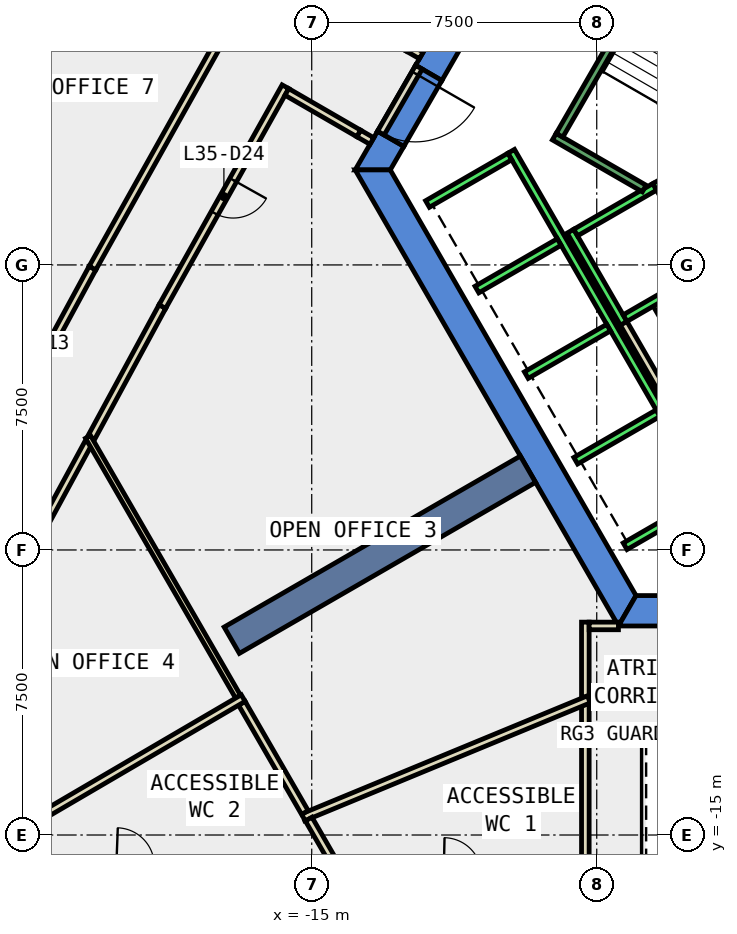
"""IFC4 building model, lengths in metres.
Left out: names, types, materials, properties, quantities, classifications, styles, units other than length and angle.
Written with IfcOpenShell. Run it as: python <this file> out.ifc"""

import sys

from ifc_helpers import new_model, si_unit, direction, frame, frame_2d, origin, place, context, subcontext, project, spatial, polyline, rectangle, outline, extrude, element, fill, save


model = new_model("IFC4")
c1 = context("Model", 3, precision=1e-05, world=origin(), true_north=direction((0.0, 1.0)))
c2 = subcontext(c1, "Body", "Model", "MODEL_VIEW")
j1 = project(units=[si_unit("LENGTHUNIT", "METRE"), si_unit("PLANEANGLEUNIT", "RADIAN")], contexts=[c1])
p1 = place(None, origin())
s1 = spatial("IfcSite", under=j1, at=p1, CompositionType="ELEMENT")
p2 = place(p1, origin())
s2 = spatial("IfcBuilding", under=s1, at=p2, CompositionType="ELEMENT")
p3 = place(p2, frame((0.0, 0.0, 159.2)))
s3 = spatial("IfcBuildingStorey", under=s2, at=p3, CompositionType="ELEMENT", Elevation=159.2)
p4 = place(p3, frame((0.0, 0.0, -0.4)))
e1 = element("IfcWall", 1, at=p4, inside=s3, PredefinedType="SHEAR", context=c2, shape_type="SweptSolid", body=[
    extrude(outline(polyline([(-12.267, 5.252), (-11.575, 4.852), (-6.466, 13.7), (-6.928, 14.5), (-12.267, 5.252)])), origin(), (0.0, 0.0, 1.0), 4.2),
])
p5 = place(p3, frame((0.0, 0.0, -0.4)))
e2 = element("IfcWall", 2, at=p5, inside=s3, PredefinedType="SHEAR", context=c2, shape_type="SweptSolid", body=[
    extrude(outline(polyline([(-12.575, 3.12), (-13.267, 3.52), (-13.856, 2.5), (-12.933, 2.5), (-12.575, 3.12)])), origin(), (0.0, 0.0, 1.0), 4.2),
])
p6 = place(p3, frame((0.0, 0.0, 3.6)))
e3 = element("IfcWall", 3, at=p6, inside=s3, PredefinedType="SHEAR", context=c2, shape_type="SweptSolid", body=[
    extrude(outline(polyline([(-13.267, 3.52), (-12.575, 3.12), (-11.575, 4.852), (-12.267, 5.252), (-13.267, 3.52)])), origin(), (0.0, 0.0, 1.0), 0.2),
])
p7 = place(p3, frame((0.0, 0.0, -0.4)))
e4 = element("IfcWall", 4, at=p7, inside=s3, PredefinedType="SHEAR", context=c2, shape_type="SweptSolid", body=[
    extrude(outline(polyline([(-13.856, 2.5), (-6.928, -9.5), (-6.466, -8.7), (-12.933, 2.5), (-13.856, 2.5)])), origin(), (0.0, 0.0, 1.0), 4.2),
])
p8 = place(p3, frame((0.0, 0.0, -0.4)))
e5 = element("IfcWall", 5, at=p8, inside=s3, PredefinedType="SHEAR", context=c2, shape_type="SweptSolid", body=[
    extrude(outline(polyline([(3.75, -9.5), (3.75, -8.7), (-6.466, -8.7), (-6.928, -9.5), (3.75, -9.5)])), origin(), (0.0, 0.0, 1.0), 4.2),
])
p9 = place(p3, frame((-9.31, -5.375, -0.4), z_axis=(0.0, 0.0, 1.0), x_axis=(-0.866017533419, -0.500013631625, 0.0)))
e6 = element("IfcWall", 6, at=p9, inside=s3, PredefinedType="SHEAR", context=c2, shape_type="SweptSolid", body=[
    extrude(rectangle(XDim=9.0, YDim=0.8, at=frame_2d((4.5, 0.0))), origin(), (0.0, 0.0, 1.0), 4.2),
])
p10 = place(p3, frame((-18.93, -1.095, 0.0), z_axis=(0.0, 0.0, 1.0), x_axis=(-0.476854303058, -0.878982351162, 0.0)))
e7 = element("IfcWall", 7, at=p10, inside=s3, PredefinedType="PARTITIONING", context=c2, shape_type="SweptSolid", body=[
    extrude(rectangle(XDim=3.924, YDim=0.2, at=frame_2d((1.962, 0.0))), origin(), (0.0, 0.0, 1.0), 3.8),
])
p11 = place(p3, frame((-13.417, 3.26, 0.0), z_axis=(0.0, 0.0, 1.0), x_axis=(-0.866398669086, 0.499352927503, 0.0)))
e8 = element("IfcWall", 8, at=p11, inside=s3, PredefinedType="PARTITIONING", context=c2, shape_type="SweptSolid", body=[
    extrude(rectangle(XDim=0.4, YDim=0.2, at=frame_2d((0.2, 0.0))), origin(), (0.0, 0.0, 1.0), 2.4),
])
p12 = place(p3, frame((-15.692, 4.689, 0.0), z_axis=(0.0, 0.0, 1.0), x_axis=(-0.48849233301, -0.872568186786, 0.0)))
e9 = element("IfcWall", 9, at=p12, inside=s3, PredefinedType="PARTITIONING", context=c2, shape_type="SweptSolid", body=[
    extrude(rectangle(XDim=6.629, YDim=0.2, at=frame_2d((3.314, 0.0))), origin(), (0.0, 0.0, 1.0), 3.8),
])
p13 = place(p12, frame((2.814, 0.0, 0.0)))
e10 = element("IfcOpeningElement", 10, at=p13, cuts=e9, PredefinedType="OPENING", context=c2, shape_type="SweptSolid", body=[
    extrude(rectangle(XDim=1.0, YDim=2.1, at=frame_2d((0.5, 1.05))), frame((0.0, 0.11, 0.0), z_axis=(0.0, -1.0, 0.0), x_axis=(1.0, 0.0, 0.0)), (0.0, 0.0, 1.0), 0.22),
])
p14 = place(p3, frame((-20.873, -4.676, 0.0), z_axis=(0.0, 0.0, 1.0), x_axis=(-0.476781985736, -0.879021579984, 0.0)))
e11 = element("IfcWall", 11, at=p14, inside=s3, PredefinedType="PARTITIONING", context=c2, shape_type="SweptSolid", body=[
    extrude(rectangle(XDim=2.869, YDim=0.2, at=frame_2d((1.435, 0.0))), origin(), (0.0, 0.0, 1.0), 3.8),
])
p15 = place(p3, frame((-24.13, -6.275, 0.0), z_axis=(0.0, 0.0, 1.0), x_axis=(0.476981750532, 0.878913198023, 0.0)))
e12 = element("IfcWall", 12, at=p15, inside=s3, PredefinedType="PARTITIONING", context=c2, shape_type="SweptSolid", body=[
    extrude(rectangle(XDim=7.046, YDim=0.2, at=frame_2d((3.523, 0.0))), origin(), (0.0, 0.0, 1.0), 3.8),
])
p16 = place(p15, frame((3.023, 0.0, 0.0)))
e13 = element("IfcOpeningElement", 13, at=p16, cuts=e12, PredefinedType="OPENING", context=c2, shape_type="SweptSolid", body=[
    extrude(rectangle(XDim=1.0, YDim=2.1, at=frame_2d((0.5, 1.05))), frame((0.0, 0.11, 0.0), z_axis=(0.0, -1.0, 0.0), x_axis=(1.0, 0.0, 0.0)), (0.0, 0.0, 1.0), 0.22),
])
p17 = place(p3, frame((-20.769, -0.082, 0.0), z_axis=(0.0, 0.0, 1.0), x_axis=(0.488387759141, 0.872626722443, 0.0)))
e14 = element("IfcWall", 14, at=p17, inside=s3, PredefinedType="PARTITIONING", context=c2, shape_type="SweptSolid", body=[
    extrude(rectangle(XDim=6.896, YDim=0.2, at=frame_2d((3.448, 0.0))), origin(), (0.0, 0.0, 1.0), 3.8),
])
p18 = place(p3, frame((-5.126, -2.422, 0.0), z_axis=(0.0, 0.0, 1.0), x_axis=(-0.500062241894, 0.865989465428, 0.0)))
e15 = element("IfcWall", 15, at=p18, inside=s3, PredefinedType="PARTITIONING", context=c2, shape_type="SweptSolid", body=[
    extrude(rectangle(XDim=1.7, YDim=0.2, at=frame_2d((0.85, 0.0))), origin(), (0.0, 0.0, 1.0), 3.8),
])
p19 = place(p3, frame((-5.492, -3.788, 0.0), z_axis=(0.0, 0.0, 1.0), x_axis=(-0.500008949224, 0.866020236886, 0.0)))
e16 = element("IfcWall", 16, at=p19, inside=s3, PredefinedType="PARTITIONING", context=c2, shape_type="SweptSolid", body=[
    extrude(rectangle(XDim=2.68, YDim=0.2, at=frame_2d((1.34, 0.0))), origin(), (0.0, 0.0, 1.0), 3.8),
])
p20 = place(p3, frame((-7.8, -11.368, 0.0), z_axis=(0.0, 0.0, 1.0), x_axis=(0.0, 1.0, 0.0)))
e17 = element("IfcWall", 17, at=p20, inside=s3, PredefinedType="PARTITIONING", context=c2, shape_type="SweptSolid", body=[
    extrude(rectangle(XDim=1.969, YDim=0.2, at=frame_2d((0.984, 0.0))), origin(), (0.0, 0.0, 1.0), 3.8),
])
p21 = place(p3, frame((-7.7, -9.499, 0.0), z_axis=(0.0, 0.0, 1.0), x_axis=(1.0, 0.0, 0.0)))
e18 = element("IfcWall", 18, at=p21, inside=s3, PredefinedType="PARTITIONING", context=c2, shape_type="SweptSolid", body=[
    extrude(rectangle(XDim=0.771, YDim=0.2, at=frame_2d((0.385, 0.0))), origin(), (0.0, 0.0, 1.0), 3.8),
])
p22 = place(p3, frame((-7.8, -16.055, 0.0), z_axis=(0.0, 0.0, 1.0), x_axis=(0.0, 1.0, 0.0)))
e19 = element("IfcWall", 19, at=p22, inside=s3, PredefinedType="PARTITIONING", context=c2, shape_type="SweptSolid", body=[
    extrude(rectangle(XDim=4.487, YDim=0.2, at=frame_2d((2.243, 0.0))), origin(), (0.0, 0.0, 1.0), 3.8),
])
p23 = place(p3, frame((-7.708, -11.43, 0.0), z_axis=(0.0, 0.0, 1.0), x_axis=(-0.924285151797, -0.381702709144, 0.0)))
e20 = element("IfcWall", 20, at=p23, inside=s3, PredefinedType="PARTITIONING", context=c2, shape_type="SweptSolid", body=[
    extrude(rectangle(XDim=8.129, YDim=0.2, at=frame_2d((4.065, 0.0))), origin(), (0.0, 0.0, 1.0), 3.8),
])
p24 = place(p3, frame((-16.939, -11.36, 0.0), z_axis=(0.0, 0.0, 1.0), x_axis=(-0.500053473428, 0.865994528685, 0.0)))
e21 = element("IfcWall", 21, at=p24, inside=s3, PredefinedType="PARTITIONING", context=c2, shape_type="SweptSolid", body=[
    extrude(rectangle(XDim=7.895, YDim=0.15, at=frame_2d((3.948, 0.0))), origin(), (0.0, 0.0, 1.0), 3.8),
])
p25 = place(p3, frame((-15.18, -14.408, 0.0), z_axis=(0.0, 0.0, 1.0), x_axis=(-0.499968694491, 0.866043477274, 0.0)))
e22 = element("IfcWall", 22, at=p25, inside=s3, PredefinedType="PARTITIONING", context=c2, shape_type="SweptSolid", body=[
    extrude(rectangle(XDim=3.319, YDim=0.2, at=frame_2d((1.659, 0.0))), origin(), (0.0, 0.0, 1.0), 3.8),
])
p26 = place(p3, frame((-14.256, -16.009, 0.0), z_axis=(0.0, 0.0, 1.0), x_axis=(-0.499786551025, 0.86614860354, 0.0)))
e23 = element("IfcWall", 23, at=p26, inside=s3, PredefinedType="PARTITIONING", context=c2, shape_type="SweptSolid", body=[
    extrude(rectangle(XDim=1.649, YDim=0.2, at=frame_2d((0.824, 0.0))), origin(), (0.0, 0.0, 1.0), 3.8),
])
p27 = place(p3, frame((-16.803, -11.397, 0.0), z_axis=(0.0, 0.0, 1.0), x_axis=(-0.863203941699, -0.504855380318, 0.0)))
e24 = element("IfcWall", 24, at=p27, inside=s3, PredefinedType="PARTITIONING", context=c2, shape_type="SweptSolid", body=[
    extrude(rectangle(XDim=8.232, YDim=0.2, at=frame_2d((4.116, 0.0))), origin(), (0.0, 0.0, 1.0), 3.8),
])
p28 = place(p3, frame((-12.18, 5.202, 0.0), z_axis=(0.0, 0.0, 1.0), x_axis=(-0.50002537861, -0.866010750942, 0.0)))
e25 = element("IfcWall", 25, at=p28, inside=s3, PredefinedType="PARTITIONING", context=c2, shape_type="SweptSolid", body=[
    extrude(rectangle(XDim=2.0, YDim=0.2, at=frame_2d((1.0, 0.0))), origin(), (0.0, 0.0, 1.0), 2.4),
])
p29 = place(p28, frame((0.19, 0.0, 0.0)))
e26 = element("IfcOpeningElement", 26, at=p29, cuts=e25, PredefinedType="OPENING", context=c2, shape_type="SweptSolid", body=[
    extrude(rectangle(XDim=1.8, YDim=2.1, at=frame_2d((0.9, 1.05))), frame((0.0, 0.11, 0.0), z_axis=(0.0, -1.0, 0.0), x_axis=(1.0, 0.0, 0.0)), (0.0, 0.0, 1.0), 0.22),
])
p30 = place(p3, frame((-12.463, 5.712, 0.0), z_axis=(0.0, 0.0, 1.0), x_axis=(0.865788603161, -0.500409926597, 0.0)))
e27 = element("IfcWall", 27, at=p30, inside=s3, PredefinedType="PARTITIONING", context=c2, shape_type="SweptSolid", body=[
    extrude(rectangle(XDim=0.4, YDim=0.2, at=frame_2d((0.2, 0.0))), origin(), (0.0, 0.0, 1.0), 2.4),
])
p31 = place(p3, frame((-13.764, 3.46, 0.0), z_axis=(0.0, 0.0, 1.0), x_axis=(-0.865872609263, 0.500264554538, 0.0)))
e28 = element("IfcWall", 28, at=p31, inside=s3, PredefinedType="PARTITIONING", context=c2, shape_type="SweptSolid", body=[
    extrude(rectangle(XDim=2.183, YDim=0.2, at=frame_2d((1.091, 0.0))), origin(), (0.0, 0.0, 1.0), 3.8),
])
p32 = place(p3, frame((-5.94, 2.188, 0.0), z_axis=(0.0, 0.0, 1.0), x_axis=(0.49994636267, -0.866056369097, 0.0)))
e29 = element("IfcWall", 29, at=p32, inside=s3, PredefinedType="STANDARD", context=c2, shape_type="SweptSolid", body=[
    extrude(rectangle(XDim=2.8, YDim=0.2, at=frame_2d((1.4, 0.0))), origin(), (0.0, 0.0, 1.0), 3.8),
])
p33 = place(p32, frame((1.225, 0.0, 0.0)))
e30 = element("IfcOpeningElement", 30, at=p33, cuts=e29, PredefinedType="OPENING", context=c2, shape_type="SweptSolid", body=[
    extrude(rectangle(XDim=1.1, YDim=2.1, at=frame_2d((0.55, 1.05))), frame((0.0, 0.11, 0.0), z_axis=(0.0, -1.0, 0.0), x_axis=(1.0, 0.0, 0.0)), (0.0, 0.0, 1.0), 0.22),
])
p34 = place(p3, frame((-8.192, 0.888, 0.0), z_axis=(0.0, 0.0, 1.0), x_axis=(0.49994636267, -0.866056369097, 0.0)))
e31 = element("IfcWall", 31, at=p34, inside=s3, PredefinedType="STANDARD", context=c2, shape_type="SweptSolid", body=[
    extrude(rectangle(XDim=2.8, YDim=0.2, at=frame_2d((1.4, 0.0))), origin(), (0.0, 0.0, 1.0), 3.8),
])
for number, where, z_axis, x_axis in (
    (32, (-5.977, 2.052, 0.0), (0.0, 0.0, 1.0), (-0.866, -0.5, 0.0)),
    (33, (-4.677, -0.2, 0.0), (0.0, 0.0, 1.0), (-0.866, -0.5, 0.0)),
):
    element("IfcWall", number, at=place(p3, frame(where, z_axis=z_axis, x_axis=x_axis)), inside=s3, PredefinedType="STANDARD", context=c2, shape_type="SweptSolid", body=[
        extrude(rectangle(XDim=2.399, YDim=0.2, at=frame_2d((1.2, 0.0))), origin(), (0.0, 0.0, 1.0), 3.8),
    ])
p35 = place(p3, frame((-9.751, 2.99, 0.0), z_axis=(0.0, 0.0, 1.0), x_axis=(0.50000090737, -0.866024879913, 0.0)))
e34 = element("IfcWall", 34, at=p35, inside=s3, PredefinedType="STANDARD", context=c2, shape_type="SweptSolid", body=[
    extrude(rectangle(XDim=10.6, YDim=0.2, at=frame_2d((5.3, 0.0))), origin(), (0.0, 0.0, 1.0), 3.8),
])
p36 = place(p3, frame((-9.788, 2.853, 0.0), z_axis=(0.0, 0.0, 1.0), x_axis=(-0.865998541277, -0.500046524342, 0.0)))
e35 = element("IfcWall", 35, at=p36, inside=s3, PredefinedType="STANDARD", context=c2, shape_type="SweptSolid", body=[
    extrude(rectangle(XDim=2.5, YDim=0.2, at=frame_2d((1.25, 0.0))), origin(), (0.0, 0.0, 1.0), 3.8),
])
for number, where, z_axis, x_axis in (
    (36, (-8.488, 0.602, 0.0), (0.0, 0.0, 1.0), (-0.866, -0.5, 0.0)),
    (37, (-7.188, -1.65, 0.0), (0.0, 0.0, 1.0), (-0.866, -0.5, 0.0)),
    (38, (-5.888, -3.902, 0.0), (0.0, 0.0, 1.0), (-0.866, -0.5, 0.0)),
    (39, (-4.588, -6.153, 0.0), (0.0, 0.0, 1.0), (-0.866, -0.5, 0.0)),
):
    element("IfcWall", number, at=place(p3, frame(where, z_axis=z_axis, x_axis=x_axis)), inside=s3, PredefinedType="STANDARD", context=c2, shape_type="SweptSolid", body=[
        extrude(rectangle(XDim=2.5, YDim=0.2, at=frame_2d((1.25, 0.0))), origin(), (0.0, 0.0, 1.0), 3.8),
    ])
p37 = place(p3, frame((-6.25, 2.01, 0.0), z_axis=(0.0, 0.0, 1.0), x_axis=(-0.86611865017, 0.499838457731, 0.0)))
e40 = element("IfcWall", 40, at=p37, inside=s3, PredefinedType="STANDARD", context=c2, shape_type="SweptSolid", body=[
    extrude(rectangle(XDim=2.733, YDim=0.2, at=frame_2d((1.366, 0.0))), origin(), (0.0, 0.0, 1.0), 3.8),
])
p38 = place(p3, frame((-5.03, 9.388, 0.0), z_axis=(0.0, 0.0, 1.0), x_axis=(-0.499978703459, -0.866037698999, 0.0)))
e41 = element("IfcWall", 41, at=p38, inside=s3, PredefinedType="STANDARD", context=c2, shape_type="SweptSolid", body=[
    extrude(rectangle(XDim=6.9, YDim=0.2, at=frame_2d((3.45, 0.0))), origin(), (0.0, 0.0, 1.0), 3.8),
])
p39 = place(p13, origin())
e42 = element("IfcDoor", 42, at=p39, inside=s3, OperationType="SINGLE_SWING_LEFT", PredefinedType="DOOR", context=c2, shape_type="SweptSolid", body=[
    extrude(rectangle(XDim=1.0, YDim=2.1, at=frame_2d((0.5, 1.05))), frame((0.0, 0.025, 0.0), z_axis=(0.0, -1.0, 0.0), x_axis=(1.0, 0.0, 0.0)), (0.0, 0.0, 1.0), 0.05),
])
fill(e10, e42)
p40 = place(p29, origin())
e43 = element("IfcDoor", 43, at=p40, inside=s3, OperationType="DOUBLE_DOOR_SINGLE_SWING", PredefinedType="DOOR", context=c2, shape_type="SweptSolid", body=[
    extrude(rectangle(XDim=1.8, YDim=2.1, at=frame_2d((0.9, 1.05))), frame((0.0, 0.025, 0.0), z_axis=(0.0, -1.0, 0.0), x_axis=(1.0, 0.0, 0.0)), (0.0, 0.0, 1.0), 0.05),
])
fill(e26, e43)
save(model, sys.argv[1])
